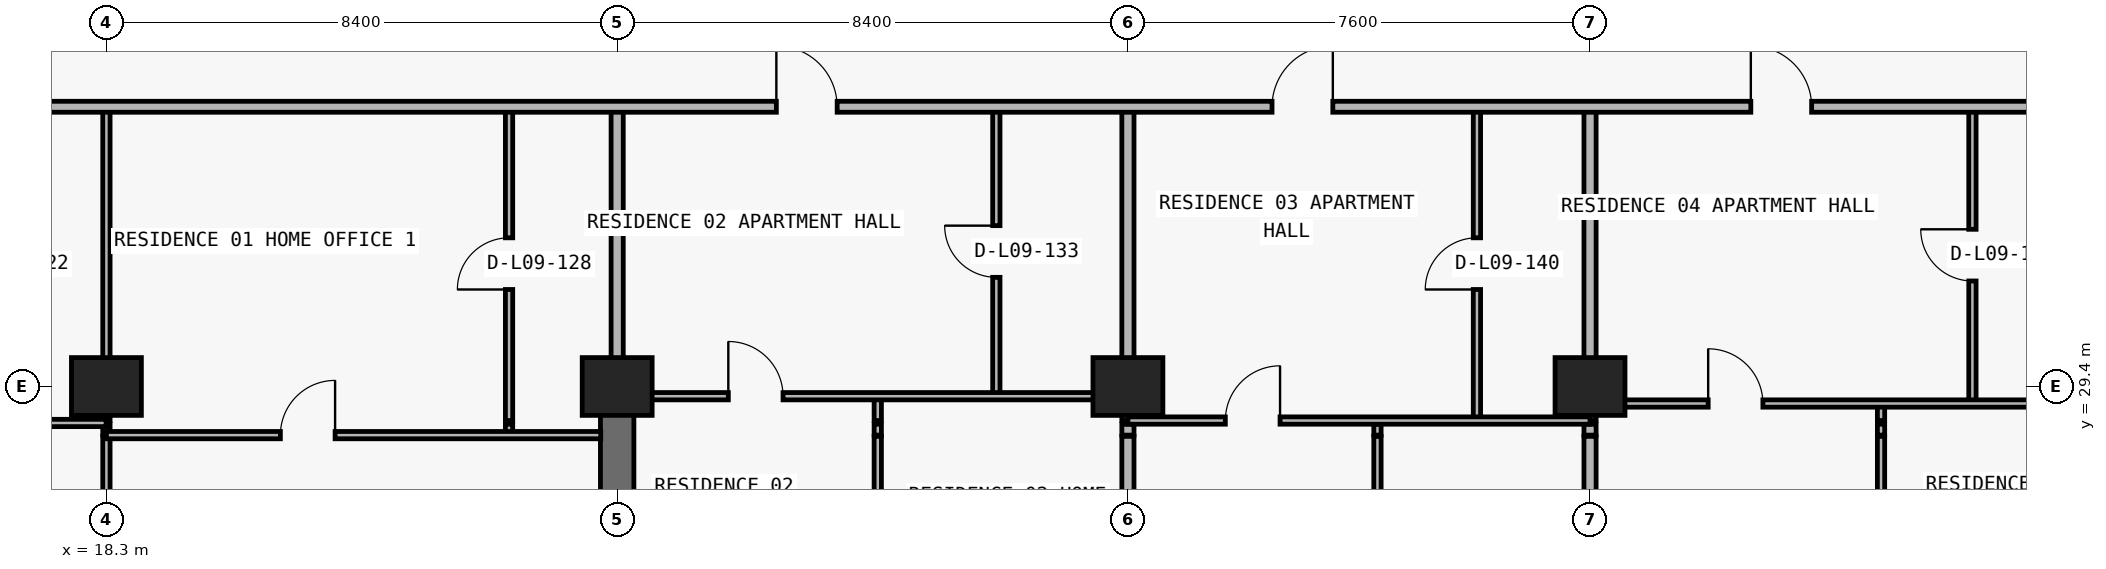
"""IFC4 building model, lengths in metres.
Left out: names, types, materials, properties, quantities, classifications, styles, units other than length and angle.
Written with IfcOpenShell. Run it as: python <this file> out.ifc"""

import sys

from ifc_helpers import new_model, si_unit, direction, frame, frame_2d, origin, origin_2d, place, context, subcontext, project, spatial, rectangle, extrude, element, fill, save


model = new_model("IFC4")
c1 = context("Model", 3, precision=1e-05, world=origin(), true_north=direction((0.0, 1.0)))
c2 = subcontext(c1, "Body", "Model", "MODEL_VIEW")
j1 = project(units=[si_unit("LENGTHUNIT", "METRE"), si_unit("PLANEANGLEUNIT", "RADIAN")], contexts=[c1])
p1 = place(None, origin())
s1 = spatial("IfcSite", under=j1, at=p1, CompositionType="ELEMENT")
p2 = place(p1, origin())
s2 = spatial("IfcBuilding", under=s1, at=p2, CompositionType="ELEMENT")
p3 = place(p2, frame((0.0, 0.0, 39.9)))
s3 = spatial("IfcBuildingStorey", under=s2, at=p3, CompositionType="ELEMENT", Elevation=39.9)
for number, where, z_axis, x_axis in (
    (1, (18.3, 29.4, 0.0), (0.0, 0.0, 1.0), (1.0, 0.0, 0.0)),
    (2, (26.7, 29.4, 0.0), (0.0, 0.0, 1.0), (1.0, 0.0, 0.0)),
    (3, (35.1, 29.4, 0.0), (0.0, 0.0, 1.0), (1.0, 0.0, 0.0)),
    (4, (42.7, 29.4, 0.0), (0.0, 0.0, 1.0), (1.0, 0.0, 0.0)),
):
    element("IfcColumn", number, at=place(p3, frame(where, z_axis=z_axis, x_axis=x_axis)), inside=s3, PredefinedType="COLUMN", context=c2, shape_type="SweptSolid", body=[
        extrude(rectangle(XDim=1.15, YDim=0.95, at=origin_2d()), origin(), (0.0, 0.0, 1.0), 3.05),
    ])
p4 = place(p3, frame((26.7, 20.8, 0.0), z_axis=(0.0, 0.0, 1.0), x_axis=(0.0, 1.0, 0.0)))
e5 = element("IfcWall", 5, at=p4, inside=s3, PredefinedType="SHEAR", context=c2, shape_type="SweptSolid", body=[
    extrude(rectangle(XDim=8.6, YDim=0.55, at=frame_2d((4.3, 0.0))), origin(), (0.0, 0.0, 1.0), 3.05),
])
p5 = place(p3, frame((18.3, 24.2, 0.0), z_axis=(0.0, 0.0, 1.0), x_axis=(0.0, 1.0, 0.0)))
e6 = element("IfcWall", 6, at=p5, inside=s3, PredefinedType="PARTITIONING", context=c2, shape_type="SweptSolid", body=[
    extrude(rectangle(XDim=4.38, YDim=0.12, at=frame_2d((2.19, 0.0))), origin(), (0.0, 0.0, 1.0), 2.11),
])
p6 = place(p5, frame((1.74, 0.0, 0.0)))
e7 = element("IfcOpeningElement", 7, at=p6, cuts=e6, PredefinedType="OPENING", context=c2, shape_type="SweptSolid", body=[
    extrude(rectangle(XDim=0.9, YDim=2.06, at=frame_2d((0.45, 1.03))), frame((0.0, 0.07, 0.0), z_axis=(0.0, -1.0, 0.0), x_axis=(1.0, 0.0, 0.0)), (0.0, 0.0, 1.0), 0.14),
])
p7 = place(p3, frame((18.3, 28.6, 0.0), z_axis=(0.0, 0.0, 1.0), x_axis=(0.0, 1.0, 0.0)))
e8 = element("IfcWall", 8, at=p7, inside=s3, PredefinedType="PARTITIONING", context=c2, shape_type="SweptSolid", body=[
    extrude(rectangle(XDim=0.18, YDim=0.12, at=frame_2d((0.09, 0.0))), origin(), (0.0, 0.0, 1.0), 2.11),
])
p8 = place(p3, frame((18.3, 28.84, 0.0), z_axis=(0.0, 0.0, 1.0), x_axis=(0.0, 1.0, 0.0)))
e9 = element("IfcWall", 9, at=p8, inside=s3, PredefinedType="PARTITIONING", context=c2, shape_type="SweptSolid", body=[
    extrude(rectangle(XDim=5.16, YDim=0.12, at=frame_2d((2.58, 0.0))), origin(), (0.0, 0.0, 1.0), 2.11),
])
p9 = place(p3, frame((24.922, 28.6, 0.0), z_axis=(0.0, 0.0, 1.0), x_axis=(0.0, 1.0, 0.0)))
e10 = element("IfcWall", 10, at=p9, inside=s3, PredefinedType="PARTITIONING", context=c2, shape_type="SweptSolid", body=[
    extrude(rectangle(XDim=0.18, YDim=0.12, at=frame_2d((0.09, 0.0))), origin(), (0.0, 0.0, 1.0), 3.05),
])
p10 = place(p3, frame((24.922, 28.84, 0.0), z_axis=(0.0, 0.0, 1.0), x_axis=(0.0, 1.0, 0.0)))
e11 = element("IfcWall", 11, at=p10, inside=s3, PredefinedType="PARTITIONING", context=c2, shape_type="SweptSolid", body=[
    extrude(rectangle(XDim=5.16, YDim=0.12, at=frame_2d((2.58, 0.0))), origin(), (0.0, 0.0, 1.0), 3.05),
])
p11 = place(p10, frame((2.155, 0.0, 0.0)))
e12 = element("IfcOpeningElement", 12, at=p11, cuts=e11, PredefinedType="OPENING", context=c2, shape_type="SweptSolid", body=[
    extrude(rectangle(XDim=0.85, YDim=2.1, at=frame_2d((0.425, 1.05))), frame((0.0, 0.07, 0.0), z_axis=(0.0, -1.0, 0.0), x_axis=(1.0, 0.0, 0.0)), (0.0, 0.0, 1.0), 0.14),
])
p12 = place(p3, frame((26.7, 29.405, 0.0), z_axis=(0.0, 0.0, 1.0), x_axis=(0.0, 1.0, 0.0)))
e13 = element("IfcWall", 13, at=p12, inside=s3, PredefinedType="PARTITIONING", context=c2, shape_type="SweptSolid", body=[
    extrude(rectangle(XDim=4.595, YDim=0.2, at=frame_2d((2.297, 0.0))), origin(), (0.0, 0.0, 1.0), 2.335),
])
p13 = place(p3, frame((30.986, 24.2, 0.0), z_axis=(0.0, 0.0, 1.0), x_axis=(0.0, 1.0, 0.0)))
e14 = element("IfcWall", 14, at=p13, inside=s3, PredefinedType="PARTITIONING", context=c2, shape_type="SweptSolid", body=[
    extrude(rectangle(XDim=4.38, YDim=0.12, at=frame_2d((2.19, 0.0))), origin(), (0.0, 0.0, 1.0), 2.423),
])
p14 = place(p13, frame((1.74, 0.0, 0.0)))
e15 = element("IfcOpeningElement", 15, at=p14, cuts=e14, PredefinedType="OPENING", context=c2, shape_type="SweptSolid", body=[
    extrude(rectangle(XDim=0.9, YDim=2.15, at=frame_2d((0.45, 1.075))), frame((0.0, 0.07, 0.0), z_axis=(0.0, -1.0, 0.0), x_axis=(1.0, 0.0, 0.0)), (0.0, 0.0, 1.0), 0.14),
])
p15 = place(p3, frame((30.986, 28.6, 0.0), z_axis=(0.0, 0.0, 1.0), x_axis=(0.0, 1.0, 0.0)))
e16 = element("IfcWall", 16, at=p15, inside=s3, PredefinedType="PARTITIONING", context=c2, shape_type="SweptSolid", body=[
    extrude(rectangle(XDim=0.18, YDim=0.12, at=frame_2d((0.09, 0.0))), origin(), (0.0, 0.0, 1.0), 2.423),
])
p16 = place(p3, frame((30.986, 28.84, 0.0), z_axis=(0.0, 0.0, 1.0), x_axis=(0.0, 1.0, 0.0)))
e17 = element("IfcWall", 17, at=p16, inside=s3, PredefinedType="PARTITIONING", context=c2, shape_type="SweptSolid", body=[
    extrude(rectangle(XDim=0.4, YDim=0.12, at=frame_2d((0.2, 0.0))), origin(), (0.0, 0.0, 1.0), 2.423),
])
p17 = place(p3, frame((32.936, 29.24, 0.0), z_axis=(0.0, 0.0, 1.0), x_axis=(0.0, 1.0, 0.0)))
e18 = element("IfcWall", 18, at=p17, inside=s3, PredefinedType="PARTITIONING", context=c2, shape_type="SweptSolid", body=[
    extrude(rectangle(XDim=4.76, YDim=0.12, at=frame_2d((2.38, 0.0))), origin(), (0.0, 0.0, 1.0), 3.05),
])
p18 = place(p17, frame((1.955, 0.0, 0.0)))
e19 = element("IfcOpeningElement", 19, at=p18, cuts=e18, PredefinedType="OPENING", context=c2, shape_type="SweptSolid", body=[
    extrude(rectangle(XDim=0.85, YDim=2.1, at=frame_2d((0.425, 1.05))), frame((0.0, 0.07, 0.0), z_axis=(0.0, -1.0, 0.0), x_axis=(1.0, 0.0, 0.0)), (0.0, 0.0, 1.0), 0.14),
])
p19 = place(p3, frame((35.1, 24.2, 0.0), z_axis=(0.0, 0.0, 1.0), x_axis=(0.0, 1.0, 0.0)))
e20 = element("IfcWall", 20, at=p19, inside=s3, PredefinedType="PARTITIONING", context=c2, shape_type="SweptSolid", body=[
    extrude(rectangle(XDim=4.38, YDim=0.2, at=frame_2d((2.19, 0.0))), origin(), (0.0, 0.0, 1.0), 2.11),
])
p20 = place(p3, frame((35.1, 28.6, 0.0), z_axis=(0.0, 0.0, 1.0), x_axis=(0.0, 1.0, 0.0)))
e21 = element("IfcWall", 21, at=p20, inside=s3, PredefinedType="PARTITIONING", context=c2, shape_type="SweptSolid", body=[
    extrude(rectangle(XDim=0.18, YDim=0.2, at=frame_2d((0.09, 0.0))), origin(), (0.0, 0.0, 1.0), 2.11),
])
p21 = place(p3, frame((35.1, 28.84, 0.0), z_axis=(0.0, 0.0, 1.0), x_axis=(0.0, 1.0, 0.0)))
e22 = element("IfcWall", 22, at=p21, inside=s3, PredefinedType="PARTITIONING", context=c2, shape_type="SweptSolid", body=[
    extrude(rectangle(XDim=5.16, YDim=0.2, at=frame_2d((2.58, 0.0))), origin(), (0.0, 0.0, 1.0), 2.11),
])
p22 = place(p3, frame((39.204, 24.2, 0.0), z_axis=(0.0, 0.0, 1.0), x_axis=(0.0, 1.0, 0.0)))
e23 = element("IfcWall", 23, at=p22, inside=s3, PredefinedType="PARTITIONING", context=c2, shape_type="SweptSolid", body=[
    extrude(rectangle(XDim=4.38, YDim=0.12, at=frame_2d((2.19, 0.0))), origin(), (0.0, 0.0, 1.0), 3.05),
])
p23 = place(p22, frame((1.74, 0.0, 0.0)))
e24 = element("IfcOpeningElement", 24, at=p23, cuts=e23, PredefinedType="OPENING", context=c2, shape_type="SweptSolid", body=[
    extrude(rectangle(XDim=0.9, YDim=2.15, at=frame_2d((0.45, 1.075))), frame((0.0, 0.07, 0.0), z_axis=(0.0, -1.0, 0.0), x_axis=(1.0, 0.0, 0.0)), (0.0, 0.0, 1.0), 0.14),
])
p24 = place(p3, frame((39.204, 28.6, 0.0), z_axis=(0.0, 0.0, 1.0), x_axis=(0.0, 1.0, 0.0)))
e25 = element("IfcWall", 25, at=p24, inside=s3, PredefinedType="PARTITIONING", context=c2, shape_type="SweptSolid", body=[
    extrude(rectangle(XDim=0.18, YDim=0.12, at=frame_2d((0.09, 0.0))), origin(), (0.0, 0.0, 1.0), 3.05),
])
p25 = place(p3, frame((40.84, 28.84, 0.0), z_axis=(0.0, 0.0, 1.0), x_axis=(0.0, 1.0, 0.0)))
e26 = element("IfcWall", 26, at=p25, inside=s3, PredefinedType="PARTITIONING", context=c2, shape_type="SweptSolid", body=[
    extrude(rectangle(XDim=5.16, YDim=0.12, at=frame_2d((2.58, 0.0))), origin(), (0.0, 0.0, 1.0), 2.578),
])
p26 = place(p25, frame((2.155, 0.0, 0.0)))
e27 = element("IfcOpeningElement", 27, at=p26, cuts=e26, PredefinedType="OPENING", context=c2, shape_type="SweptSolid", body=[
    extrude(rectangle(XDim=0.85, YDim=2.1, at=frame_2d((0.425, 1.05))), frame((0.0, 0.07, 0.0), z_axis=(0.0, -1.0, 0.0), x_axis=(1.0, 0.0, 0.0)), (0.0, 0.0, 1.0), 0.14),
])
p27 = place(p3, frame((42.7, 24.2, 0.0), z_axis=(0.0, 0.0, 1.0), x_axis=(0.0, 1.0, 0.0)))
e28 = element("IfcWall", 28, at=p27, inside=s3, PredefinedType="PARTITIONING", context=c2, shape_type="SweptSolid", body=[
    extrude(rectangle(XDim=4.38, YDim=0.2, at=frame_2d((2.19, 0.0))), origin(), (0.0, 0.0, 1.0), 2.11),
])
p28 = place(p3, frame((42.7, 28.6, 0.0), z_axis=(0.0, 0.0, 1.0), x_axis=(0.0, 1.0, 0.0)))
e29 = element("IfcWall", 29, at=p28, inside=s3, PredefinedType="PARTITIONING", context=c2, shape_type="SweptSolid", body=[
    extrude(rectangle(XDim=0.18, YDim=0.2, at=frame_2d((0.09, 0.0))), origin(), (0.0, 0.0, 1.0), 2.11),
])
p29 = place(p3, frame((42.7, 28.84, 0.0), z_axis=(0.0, 0.0, 1.0), x_axis=(0.0, 1.0, 0.0)))
e30 = element("IfcWall", 30, at=p29, inside=s3, PredefinedType="PARTITIONING", context=c2, shape_type="SweptSolid", body=[
    extrude(rectangle(XDim=5.16, YDim=0.2, at=frame_2d((2.58, 0.0))), origin(), (0.0, 0.0, 1.0), 2.11),
])
p30 = place(p3, frame((47.486, 24.2, 0.0), z_axis=(0.0, 0.0, 1.0), x_axis=(0.0, 1.0, 0.0)))
e31 = element("IfcWall", 31, at=p30, inside=s3, PredefinedType="PARTITIONING", context=c2, shape_type="SweptSolid", body=[
    extrude(rectangle(XDim=4.38, YDim=0.12, at=frame_2d((2.19, 0.0))), origin(), (0.0, 0.0, 1.0), 3.05),
])
p31 = place(p30, frame((1.74, 0.0, 0.0)))
e32 = element("IfcOpeningElement", 32, at=p31, cuts=e31, PredefinedType="OPENING", context=c2, shape_type="SweptSolid", body=[
    extrude(rectangle(XDim=0.9, YDim=2.15, at=frame_2d((0.45, 1.075))), frame((0.0, 0.07, 0.0), z_axis=(0.0, -1.0, 0.0), x_axis=(1.0, 0.0, 0.0)), (0.0, 0.0, 1.0), 0.14),
])
p32 = place(p3, frame((47.486, 28.6, 0.0), z_axis=(0.0, 0.0, 1.0), x_axis=(0.0, 1.0, 0.0)))
e33 = element("IfcWall", 33, at=p32, inside=s3, PredefinedType="PARTITIONING", context=c2, shape_type="SweptSolid", body=[
    extrude(rectangle(XDim=0.18, YDim=0.12, at=frame_2d((0.09, 0.0))), origin(), (0.0, 0.0, 1.0), 3.05),
])
p33 = place(p3, frame((47.486, 28.84, 0.0), z_axis=(0.0, 0.0, 1.0), x_axis=(0.0, 1.0, 0.0)))
e34 = element("IfcWall", 34, at=p33, inside=s3, PredefinedType="PARTITIONING", context=c2, shape_type="SweptSolid", body=[
    extrude(rectangle(XDim=0.28, YDim=0.12, at=frame_2d((0.14, 0.0))), origin(), (0.0, 0.0, 1.0), 3.05),
])
p34 = place(p3, frame((48.989, 29.12, 0.0), z_axis=(0.0, 0.0, 1.0), x_axis=(0.0, 1.0, 0.0)))
e35 = element("IfcWall", 35, at=p34, inside=s3, PredefinedType="PARTITIONING", context=c2, shape_type="SweptSolid", body=[
    extrude(rectangle(XDim=4.88, YDim=0.12, at=frame_2d((2.44, 0.0))), origin(), (0.0, 0.0, 1.0), 2.578),
])
p35 = place(p34, frame((2.015, 0.0, 0.0)))
e36 = element("IfcOpeningElement", 36, at=p35, cuts=e35, PredefinedType="OPENING", context=c2, shape_type="SweptSolid", body=[
    extrude(rectangle(XDim=0.85, YDim=2.1, at=frame_2d((0.425, 1.05))), frame((0.0, 0.07, 0.0), z_axis=(0.0, -1.0, 0.0), x_axis=(1.0, 0.0, 0.0)), (0.0, 0.0, 1.0), 0.14),
])
p36 = place(p3, frame((18.3, 28.6, 0.0), z_axis=(0.0, 0.0, 1.0), x_axis=(1.0, 0.0, 0.0)))
e37 = element("IfcWall", 37, at=p36, inside=s3, PredefinedType="PARTITIONING", context=c2, shape_type="SweptSolid", body=[
    extrude(rectangle(XDim=8.13, YDim=0.12, at=frame_2d((4.065, 0.0))), origin(), (0.0, 0.0, 1.0), 3.05),
])
p37 = place(p36, frame((2.861, 0.0, 0.0)))
e38 = element("IfcOpeningElement", 38, at=p37, cuts=e37, PredefinedType="OPENING", context=c2, shape_type="SweptSolid", body=[
    extrude(rectangle(XDim=0.9, YDim=2.15, at=frame_2d((0.45, 1.075))), frame((0.0, 0.07, 0.0), z_axis=(0.0, -1.0, 0.0), x_axis=(1.0, 0.0, 0.0)), (0.0, 0.0, 1.0), 0.14),
])
p38 = place(p3, frame((9.9, 28.8, 0.0), z_axis=(0.0, 0.0, 1.0), x_axis=(1.0, 0.0, 0.0)))
e39 = element("IfcWall", 39, at=p38, inside=s3, PredefinedType="PARTITIONING", context=c2, shape_type="SweptSolid", body=[
    extrude(rectangle(XDim=8.395, YDim=0.12, at=frame_2d((4.198, 0.0))), origin(), (0.0, 0.0, 1.0), 3.05),
])
p39 = place(p38, frame((1.44, 0.0, 0.0)))
e40 = element("IfcOpeningElement", 40, at=p39, cuts=e39, PredefinedType="OPENING", context=c2, shape_type="SweptSolid", body=[
    extrude(rectangle(XDim=0.9, YDim=2.15, at=frame_2d((0.45, 1.075))), frame((0.0, 0.07, 0.0), z_axis=(0.0, -1.0, 0.0), x_axis=(1.0, 0.0, 0.0)), (0.0, 0.0, 1.0), 0.14),
])
p40 = place(p3, frame((35.1, 28.84, 0.0), z_axis=(0.0, 0.0, 1.0), x_axis=(1.0, 0.0, 0.0)))
e41 = element("IfcWall", 41, at=p40, inside=s3, PredefinedType="PARTITIONING", context=c2, shape_type="SweptSolid", body=[
    extrude(rectangle(XDim=7.6, YDim=0.12, at=frame_2d((3.8, 0.0))), origin(), (0.0, 0.0, 1.0), 3.05),
])
p41 = place(p40, frame((1.602, 0.0, 0.0)))
e42 = element("IfcOpeningElement", 42, at=p41, cuts=e41, PredefinedType="OPENING", context=c2, shape_type="SweptSolid", body=[
    extrude(rectangle(XDim=0.9, YDim=2.15, at=frame_2d((0.45, 1.075))), frame((0.0, 0.07, 0.0), z_axis=(0.0, -1.0, 0.0), x_axis=(1.0, 0.0, 0.0)), (0.0, 0.0, 1.0), 0.14),
])
p42 = place(p3, frame((42.7, 29.12, 0.0), z_axis=(0.0, 0.0, 1.0), x_axis=(1.0, 0.0, 0.0)))
e43 = element("IfcWall", 43, at=p42, inside=s3, PredefinedType="PARTITIONING", context=c2, shape_type="SweptSolid", body=[
    extrude(rectangle(XDim=8.13, YDim=0.12, at=frame_2d((4.065, 0.0))), origin(), (0.0, 0.0, 1.0), 2.11),
])
p43 = place(p42, frame((1.943, 0.0, 0.0)))
e44 = element("IfcOpeningElement", 44, at=p43, cuts=e43, PredefinedType="OPENING", context=c2, shape_type="SweptSolid", body=[
    extrude(rectangle(XDim=0.9, YDim=2.06, at=frame_2d((0.45, 1.03))), frame((0.0, 0.07, 0.0), z_axis=(0.0, -1.0, 0.0), x_axis=(1.0, 0.0, 0.0)), (0.0, 0.0, 1.0), 0.14),
])
p44 = place(p3, frame((26.97, 29.24, 0.0), z_axis=(0.0, 0.0, 1.0), x_axis=(1.0, 0.0, 0.0)))
e45 = element("IfcWall", 45, at=p44, inside=s3, PredefinedType="PARTITIONING", context=c2, shape_type="SweptSolid", body=[
    extrude(rectangle(XDim=8.13, YDim=0.12, at=frame_2d((4.065, 0.0))), origin(), (0.0, 0.0, 1.0), 2.11),
])
p45 = place(p44, frame((1.558, 0.0, 0.0)))
e46 = element("IfcOpeningElement", 46, at=p45, cuts=e45, PredefinedType="OPENING", context=c2, shape_type="SweptSolid", body=[
    extrude(rectangle(XDim=0.9, YDim=2.06, at=frame_2d((0.45, 1.03))), frame((0.0, 0.07, 0.0), z_axis=(0.0, -1.0, 0.0), x_axis=(1.0, 0.0, 0.0)), (0.0, 0.0, 1.0), 0.14),
])
p46 = place(p3, frame((5.105, 34.0, 0.0), z_axis=(0.0, 0.0, 1.0), x_axis=(1.0, 0.0, 0.0)))
e47 = element("IfcWall", 47, at=p46, inside=s3, PredefinedType="PARTITIONING", context=c2, shape_type="SweptSolid", body=[
    extrude(rectangle(XDim=67.595, YDim=0.18, at=frame_2d((33.797, 0.0))), origin(), (0.0, 0.0, 1.0), 3.05),
])
p47 = place(p46, frame((7.504, 0.0, 0.0)))
e48 = element("IfcOpeningElement", 48, at=p47, cuts=e47, PredefinedType="OPENING", context=c2, shape_type="SweptSolid", body=[
    extrude(rectangle(XDim=1.0, YDim=2.2, at=frame_2d((0.5, 1.1))), frame((0.0, 0.1, 0.0), z_axis=(0.0, -1.0, 0.0), x_axis=(1.0, 0.0, 0.0)), (0.0, 0.0, 1.0), 0.2),
])
p48 = place(p46, frame((24.213, 0.0, 0.0)))
e49 = element("IfcOpeningElement", 49, at=p48, cuts=e47, PredefinedType="OPENING", context=c2, shape_type="SweptSolid", body=[
    extrude(rectangle(XDim=1.0, YDim=2.2, at=frame_2d((0.5, 1.1))), frame((0.0, 0.1, 0.0), z_axis=(0.0, -1.0, 0.0), x_axis=(1.0, 0.0, 0.0)), (0.0, 0.0, 1.0), 0.2),
])
p49 = place(p46, frame((32.365, 0.0, 0.0)))
e50 = element("IfcOpeningElement", 50, at=p49, cuts=e47, PredefinedType="OPENING", context=c2, shape_type="SweptSolid", body=[
    extrude(rectangle(XDim=1.0, YDim=2.2, at=frame_2d((0.5, 1.1))), frame((0.0, 0.1, 0.0), z_axis=(0.0, -1.0, 0.0), x_axis=(1.0, 0.0, 0.0)), (0.0, 0.0, 1.0), 0.2),
])
p50 = place(p46, frame((40.24, 0.0, 0.0)))
e51 = element("IfcOpeningElement", 51, at=p50, cuts=e47, PredefinedType="OPENING", context=c2, shape_type="SweptSolid", body=[
    extrude(rectangle(XDim=1.0, YDim=2.2, at=frame_2d((0.5, 1.1))), frame((0.0, 0.1, 0.0), z_axis=(0.0, -1.0, 0.0), x_axis=(1.0, 0.0, 0.0)), (0.0, 0.0, 1.0), 0.2),
])
p51 = place(p46, frame((48.708, 0.0, 0.0)))
e52 = element("IfcOpeningElement", 52, at=p51, cuts=e47, PredefinedType="OPENING", context=c2, shape_type="SweptSolid", body=[
    extrude(rectangle(XDim=1.0, YDim=2.2, at=frame_2d((0.5, 1.1))), frame((0.0, 0.1, 0.0), z_axis=(0.0, -1.0, 0.0), x_axis=(1.0, 0.0, 0.0)), (0.0, 0.0, 1.0), 0.2),
])
p52 = place(p37, origin())
e53 = element("IfcDoor", 53, at=p52, inside=s3, OperationType="SINGLE_SWING_RIGHT", PredefinedType="DOOR", context=c2, shape_type="SweptSolid", body=[
    extrude(rectangle(XDim=0.9, YDim=2.15, at=frame_2d((0.45, 1.075))), frame((0.0, 0.025, 0.0), z_axis=(0.0, -1.0, 0.0), x_axis=(1.0, 0.0, 0.0)), (0.0, 0.0, 1.0), 0.05),
])
fill(e38, e53)
p53 = place(p11, origin())
e54 = element("IfcDoor", 54, at=p53, inside=s3, OperationType="SINGLE_SWING_LEFT", PredefinedType="DOOR", context=c2, shape_type="SweptSolid", body=[
    extrude(rectangle(XDim=0.85, YDim=2.1, at=frame_2d((0.425, 1.05))), frame((0.0, 0.025, 0.0), z_axis=(0.0, -1.0, 0.0), x_axis=(1.0, 0.0, 0.0)), (0.0, 0.0, 1.0), 0.05),
])
fill(e12, e54)
p54 = place(p48, origin())
e55 = element("IfcDoor", 55, at=p54, inside=s3, OperationType="SINGLE_SWING_LEFT", PredefinedType="DOOR", context=c2, shape_type="SweptSolid", body=[
    extrude(rectangle(XDim=1.0, YDim=2.2, at=frame_2d((0.5, 1.1))), frame((0.0, 0.025, 0.0), z_axis=(0.0, -1.0, 0.0), x_axis=(1.0, 0.0, 0.0)), (0.0, 0.0, 1.0), 0.05),
])
fill(e49, e55)
p55 = place(p18, origin())
e56 = element("IfcDoor", 56, at=p55, inside=s3, OperationType="SINGLE_SWING_RIGHT", PredefinedType="DOOR", context=c2, shape_type="SweptSolid", body=[
    extrude(rectangle(XDim=0.85, YDim=2.1, at=frame_2d((0.425, 1.05))), frame((0.0, 0.025, 0.0), z_axis=(0.0, -1.0, 0.0), x_axis=(1.0, 0.0, 0.0)), (0.0, 0.0, 1.0), 0.05),
])
fill(e19, e56)
p56 = place(p45, origin())
e57 = element("IfcDoor", 57, at=p56, inside=s3, OperationType="SINGLE_SWING_LEFT", PredefinedType="DOOR", context=c2, shape_type="SweptSolid", body=[
    extrude(rectangle(XDim=0.9, YDim=2.06, at=frame_2d((0.45, 1.03))), frame((0.0, 0.025, 0.0), z_axis=(0.0, -1.0, 0.0), x_axis=(1.0, 0.0, 0.0)), (0.0, 0.0, 1.0), 0.05),
])
fill(e46, e57)
p57 = place(p49, origin())
e58 = element("IfcDoor", 58, at=p57, inside=s3, OperationType="SINGLE_SWING_RIGHT", PredefinedType="DOOR", context=c2, shape_type="SweptSolid", body=[
    extrude(rectangle(XDim=1.0, YDim=2.2, at=frame_2d((0.5, 1.1))), frame((0.0, 0.025, 0.0), z_axis=(0.0, -1.0, 0.0), x_axis=(1.0, 0.0, 0.0)), (0.0, 0.0, 1.0), 0.05),
])
fill(e50, e58)
p58 = place(p26, origin())
e59 = element("IfcDoor", 59, at=p58, inside=s3, OperationType="SINGLE_SWING_LEFT", PredefinedType="DOOR", context=c2, shape_type="SweptSolid", body=[
    extrude(rectangle(XDim=0.85, YDim=2.1, at=frame_2d((0.425, 1.05))), frame((0.0, 0.025, 0.0), z_axis=(0.0, -1.0, 0.0), x_axis=(1.0, 0.0, 0.0)), (0.0, 0.0, 1.0), 0.05),
])
fill(e27, e59)
p59 = place(p41, origin())
e60 = element("IfcDoor", 60, at=p59, inside=s3, OperationType="SINGLE_SWING_RIGHT", PredefinedType="DOOR", context=c2, shape_type="SweptSolid", body=[
    extrude(rectangle(XDim=0.9, YDim=2.15, at=frame_2d((0.45, 1.075))), frame((0.0, 0.025, 0.0), z_axis=(0.0, -1.0, 0.0), x_axis=(1.0, 0.0, 0.0)), (0.0, 0.0, 1.0), 0.05),
])
fill(e42, e60)
p60 = place(p50, origin())
e61 = element("IfcDoor", 61, at=p60, inside=s3, OperationType="SINGLE_SWING_LEFT", PredefinedType="DOOR", context=c2, shape_type="SweptSolid", body=[
    extrude(rectangle(XDim=1.0, YDim=2.2, at=frame_2d((0.5, 1.1))), frame((0.0, 0.025, 0.0), z_axis=(0.0, -1.0, 0.0), x_axis=(1.0, 0.0, 0.0)), (0.0, 0.0, 1.0), 0.05),
])
fill(e51, e61)
p61 = place(p35, origin())
e62 = element("IfcDoor", 62, at=p61, inside=s3, OperationType="SINGLE_SWING_RIGHT", PredefinedType="DOOR", context=c2, shape_type="SweptSolid", body=[
    extrude(rectangle(XDim=0.85, YDim=2.1, at=frame_2d((0.425, 1.05))), frame((0.0, 0.025, 0.0), z_axis=(0.0, -1.0, 0.0), x_axis=(1.0, 0.0, 0.0)), (0.0, 0.0, 1.0), 0.05),
])
fill(e36, e62)
p62 = place(p43, origin())
e63 = element("IfcDoor", 63, at=p62, inside=s3, OperationType="SINGLE_SWING_LEFT", PredefinedType="DOOR", context=c2, shape_type="SweptSolid", body=[
    extrude(rectangle(XDim=0.9, YDim=2.06, at=frame_2d((0.45, 1.03))), frame((0.0, 0.025, 0.0), z_axis=(0.0, -1.0, 0.0), x_axis=(1.0, 0.0, 0.0)), (0.0, 0.0, 1.0), 0.05),
])
fill(e44, e63)
save(model, sys.argv[1])
